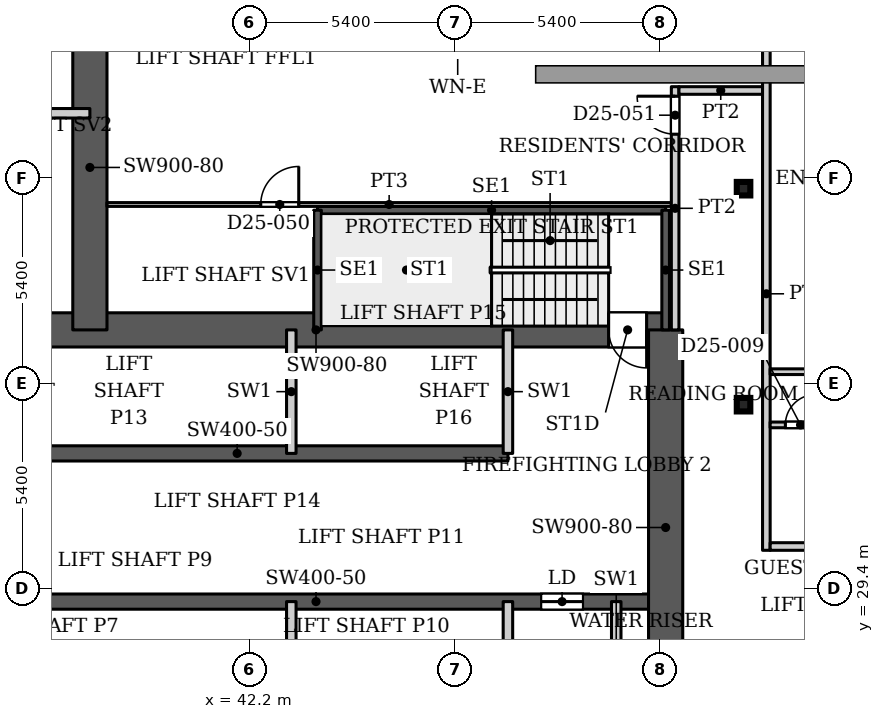
"""IFC4 building model, lengths in metres.
Left out: names, types, materials, properties, quantities, classifications, styles, units other than length and angle.
Written with IfcOpenShell. Run it as: python <this file> out.ifc"""

import sys

from ifc_helpers import new_model, si_unit, direction, frame, frame_2d, origin, origin_2d, place, context, subcontext, project, spatial, rectangle, hollow_rectangle, extrude, source, transform, mapped, element, fill, save


model = new_model("IFC4")
c1 = context("Model", 3, precision=1e-05, world=origin(), true_north=direction((0.0, 1.0)))
c2 = subcontext(c1, "Body", "Model", "MODEL_VIEW")
j1 = project(units=[si_unit("LENGTHUNIT", "METRE"), si_unit("PLANEANGLEUNIT", "RADIAN")], contexts=[c1])
p1 = place(None, origin())
s1 = spatial("IfcSite", under=j1, at=p1, CompositionType="ELEMENT")
p2 = place(p1, origin())
s2 = spatial("IfcBuilding", under=s1, at=p2, CompositionType="ELEMENT")
p3 = place(p2, frame((0.0, 0.0, 113.6)))
s3 = spatial("IfcBuildingStorey", under=s2, at=p3, CompositionType="ELEMENT", Elevation=113.6)
for number, where, z_axis, x_axis in (
    (1, (55.2, 34.232, 0.0), (0.0, 0.0, 1.0), (1.0, 0.0, 0.0)),
    (2, (55.2, 39.916, 0.0), (0.0, 0.0, 1.0), (1.0, 0.0, 0.0)),
):
    element("IfcColumn", number, at=place(p3, frame(where, z_axis=z_axis, x_axis=x_axis)), inside=s3, PredefinedType="COLUMN", context=c2, shape_type="SweptSolid", body=[
        extrude(hollow_rectangle(XDim=0.356, YDim=0.356, WallThickness=0.016, InnerFilletRadius=0.016, OuterFilletRadius=0.032, at=origin_2d()), origin(), (0.0, 0.0, 1.0), 3.9),
    ])
p4 = place(p3, frame((34.75, 29.05, 0.0), z_axis=(0.0, 0.0, 1.0), x_axis=(1.0, 0.0, 0.0)))
e3 = element("IfcWall", 3, at=p4, inside=s3, PredefinedType="SHEAR", context=c2, shape_type="SweptSolid", body=[
    extrude(rectangle(XDim=18.4, YDim=0.4, at=frame_2d((9.2, 0.0))), origin(), (0.0, 0.0, 1.0), 3.9),
])
p5 = place(p4, frame((15.125, 0.0, 0.0)))
e4 = element("IfcOpeningElement", 4, at=p5, cuts=e3, PredefinedType="OPENING", context=c2, shape_type="SweptSolid", body=[
    extrude(rectangle(XDim=1.1, YDim=2.2, at=frame_2d((0.55, 1.1))), frame((0.0, 0.21, 0.0), z_axis=(0.0, -1.0, 0.0), x_axis=(1.0, 0.0, 0.0)), (0.0, 0.0, 1.0), 0.42),
])
p6 = place(p3, frame((34.75, 32.95, 0.0), z_axis=(0.0, 0.0, 1.0), x_axis=(1.0, 0.0, 0.0)))
e5 = element("IfcWall", 5, at=p6, inside=s3, PredefinedType="SHEAR", context=c2, shape_type="SweptSolid", body=[
    extrude(rectangle(XDim=14.25, YDim=0.4, at=frame_2d((7.125, 0.0))), origin(), (0.0, 0.0, 1.0), 3.9),
])
p7 = place(p3, frame((34.75, 36.2, 0.0), z_axis=(0.0, 0.0, 1.0), x_axis=(1.0, 0.0, 0.0)))
e6 = element("IfcWall", 6, at=p7, inside=s3, PredefinedType="SHEAR", context=c2, shape_type="SweptSolid", body=[
    extrude(rectangle(XDim=18.4, YDim=0.9, at=frame_2d((9.2, 0.0))), origin(), (0.0, 0.0, 1.0), 3.9),
])
p8 = place(p7, frame((16.9, 0.0, 0.0)))
e7 = element("IfcOpeningElement", 7, at=p8, cuts=e6, PredefinedType="OPENING", context=c2, shape_type="SweptSolid", body=[
    extrude(rectangle(XDim=1.0, YDim=2.2, at=frame_2d((0.5, 1.1))), frame((0.0, 0.46, 0.0), z_axis=(0.0, -1.0, 0.0), x_axis=(1.0, 0.0, 0.0)), (0.0, 0.0, 1.0), 0.92),
])
p9 = place(p3, frame((38.0, 36.2, 0.0), z_axis=(0.0, 0.0, 1.0), x_axis=(0.0, 1.0, 0.0)))
e8 = element("IfcWall", 8, at=p9, inside=s3, PredefinedType="SHEAR", context=c2, shape_type="SweptSolid", body=[
    extrude(rectangle(XDim=8.55, YDim=0.9, at=frame_2d((4.275, 0.0))), origin(), (0.0, 0.0, 1.0), 3.9),
])
p10 = place(p3, frame((53.15, 25.8, 0.0), z_axis=(0.0, 0.0, 1.0), x_axis=(0.0, 1.0, 0.0)))
e9 = element("IfcWall", 9, at=p10, inside=s3, PredefinedType="SHEAR", context=c2, shape_type="SweptSolid", body=[
    extrude(rectangle(XDim=10.4, YDim=0.9, at=frame_2d((5.2, 0.0))), origin(), (0.0, 0.0, 1.0), 3.9),
])
p11 = place(p10, frame((1.175, 0.0, 0.0)))
e10 = element("IfcOpeningElement", 10, at=p11, cuts=e9, PredefinedType="OPENING", context=c2, shape_type="SweptSolid", body=[
    extrude(rectangle(XDim=0.9, YDim=2.2, at=frame_2d((0.45, 1.1))), frame((0.0, 0.46, 0.0), z_axis=(0.0, -1.0, 0.0), x_axis=(1.0, 0.0, 0.0)), (0.0, 0.0, 1.0), 0.92),
])
p12 = place(p3, frame((43.99, 39.35, 0.0), z_axis=(0.0, 0.0, 1.0), x_axis=(1.0, 0.0, 0.0)))
e11 = element("IfcWall", 11, at=p12, inside=s3, PredefinedType="SHEAR", context=c2, shape_type="SweptSolid", body=[
    extrude(rectangle(XDim=9.16, YDim=0.2, at=frame_2d((4.58, 0.0))), origin(), (0.0, 0.0, 1.0), 3.9),
])
for number, where, z_axis, x_axis in (
    (12, (43.99, 36.2, 0.0), (0.0, 0.0, 1.0), (0.0, 1.0, 0.0)),
    (13, (53.15, 36.2, 0.0), (0.0, 0.0, 1.0), (0.0, 1.0, 0.0)),
):
    element("IfcWall", number, at=place(p3, frame(where, z_axis=z_axis, x_axis=x_axis)), inside=s3, PredefinedType="SHEAR", context=c2, shape_type="SweptSolid", body=[
        extrude(rectangle(XDim=3.15, YDim=0.2, at=frame_2d((1.575, 0.0))), origin(), (0.0, 0.0, 1.0), 3.9),
    ])
for number, where, z_axis, x_axis in (
    (14, (43.3, 25.8, 0.0), (0.0, 0.0, 1.0), (0.0, 1.0, 0.0)),
    (15, (43.3, 32.95, 0.0), (0.0, 0.0, 1.0), (0.0, 1.0, 0.0)),
    (16, (49.0, 25.8, 0.0), (0.0, 0.0, 1.0), (0.0, 1.0, 0.0)),
    (17, (49.0, 32.95, 0.0), (0.0, 0.0, 1.0), (0.0, 1.0, 0.0)),
    (18, (51.85, 25.8, 0.0), (0.0, 0.0, 1.0), (0.0, 1.0, 0.0)),
    (19, (34.75, 41.9, 0.0), (0.0, 0.0, 1.0), (1.0, 0.0, 0.0)),
):
    element("IfcWall", number, at=place(p3, frame(where, z_axis=z_axis, x_axis=x_axis)), inside=s3, PredefinedType="PARTITIONING", context=c2, shape_type="SweptSolid", body=[
        extrude(rectangle(XDim=3.25, YDim=0.25, at=frame_2d((1.625, 0.0))), origin(), (0.0, 0.0, 1.0), 3.9),
    ])
p13 = place(p3, frame((38.449, 39.5, 0.0), z_axis=(0.0, 0.0, 1.0), x_axis=(1.0, 0.0, 0.0)))
e20 = element("IfcWall", 20, at=p13, inside=s3, PredefinedType="PARTITIONING", context=c2, shape_type="SweptSolid", body=[
    extrude(rectangle(XDim=14.851, YDim=0.1, at=frame_2d((7.426, 0.0))), origin(), (0.0, 0.0, 1.0), 3.6),
])
p14 = place(p13, frame((4.047, 0.0, 0.0)))
e21 = element("IfcOpeningElement", 21, at=p14, cuts=e20, PredefinedType="OPENING", context=c2, shape_type="SweptSolid", body=[
    extrude(rectangle(XDim=1.0, YDim=2.1, at=frame_2d((0.5, 1.05))), frame((0.0, 0.06, 0.0), z_axis=(0.0, -1.0, 0.0), x_axis=(1.0, 0.0, 0.0)), (0.0, 0.0, 1.0), 0.12),
])
p15 = place(p3, frame((53.4, 36.199, 0.0), z_axis=(0.0, 0.0, 1.0), x_axis=(0.0, 1.0, 0.0)))
e22 = element("IfcWall", 22, at=p15, inside=s3, PredefinedType="PARTITIONING", context=c2, shape_type="SweptSolid", body=[
    extrude(rectangle(XDim=6.401, YDim=0.2, at=frame_2d((3.201, 0.0))), origin(), (0.0, 0.0, 1.0), 3.6),
])
p16 = place(p15, frame((5.151, 0.0, 0.0)))
e23 = element("IfcOpeningElement", 23, at=p16, cuts=e22, PredefinedType="OPENING", context=c2, shape_type="SweptSolid", body=[
    extrude(rectangle(XDim=1.0, YDim=2.1, at=frame_2d((0.5, 1.05))), frame((0.0, 0.11, 0.0), z_axis=(0.0, -1.0, 0.0), x_axis=(1.0, 0.0, 0.0)), (0.0, 0.0, 1.0), 0.22),
])
p17 = place(p3, frame((53.5, 42.5, 0.0), z_axis=(0.0, 0.0, 1.0), x_axis=(1.0, 0.0, 0.0)))
e24 = element("IfcWall", 24, at=p17, inside=s3, PredefinedType="PARTITIONING", context=c2, shape_type="SweptSolid", body=[
    extrude(rectangle(XDim=2.2, YDim=0.2, at=frame_2d((1.1, 0.0))), origin(), (0.0, 0.0, 1.0), 3.6),
])
p18 = place(p3, frame((55.8, 30.4, 0.0), z_axis=(0.0, 0.0, 1.0), x_axis=(0.0, 1.0, 0.0)))
e25 = element("IfcWall", 25, at=p18, inside=s3, PredefinedType="PARTITIONING", context=c2, shape_type="SweptSolid", body=[
    extrude(rectangle(XDim=13.5, YDim=0.2, at=frame_2d((6.75, 0.0))), origin(), (0.0, 0.0, 1.0), 3.6),
])
p19 = place(p3, frame((55.9, 30.5, 0.0), z_axis=(0.0, 0.0, 1.0), x_axis=(1.0, 0.0, 0.0)))
e26 = element("IfcWall", 26, at=p19, inside=s3, PredefinedType="PARTITIONING", context=c2, shape_type="SweptSolid", body=[
    extrude(rectangle(XDim=42.2, YDim=0.2, at=frame_2d((21.1, 0.0))), origin(), (0.0, 0.0, 1.0), 3.6),
])
p20 = place(p19, frame((9.75, 0.0, 0.0)))
e27 = element("IfcOpeningElement", 27, at=p20, cuts=e26, PredefinedType="OPENING", context=c2, shape_type="SweptSolid", body=[
    extrude(rectangle(XDim=1.0, YDim=2.1, at=frame_2d((0.5, 1.05))), frame((0.0, 0.11, 0.0), z_axis=(0.0, -1.0, 0.0), x_axis=(1.0, 0.0, 0.0)), (0.0, 0.0, 1.0), 0.22),
])
p21 = place(p19, frame((18.6, 0.0, 0.0)))
e28 = element("IfcOpeningElement", 28, at=p21, cuts=e26, PredefinedType="OPENING", context=c2, shape_type="SweptSolid", body=[
    extrude(rectangle(XDim=1.0, YDim=2.1, at=frame_2d((0.5, 1.05))), frame((0.0, 0.11, 0.0), z_axis=(0.0, -1.0, 0.0), x_axis=(1.0, 0.0, 0.0)), (0.0, 0.0, 1.0), 0.22),
])
p22 = place(p19, frame((23.4, 0.0, 0.0)))
e29 = element("IfcOpeningElement", 29, at=p22, cuts=e26, PredefinedType="OPENING", context=c2, shape_type="SweptSolid", body=[
    extrude(rectangle(XDim=1.0, YDim=2.1, at=frame_2d((0.5, 1.05))), frame((0.0, 0.11, 0.0), z_axis=(0.0, -1.0, 0.0), x_axis=(1.0, 0.0, 0.0)), (0.0, 0.0, 1.0), 0.22),
])
p23 = place(p19, frame((40.2, 0.0, 0.0)))
e30 = element("IfcOpeningElement", 30, at=p23, cuts=e26, PredefinedType="OPENING", context=c2, shape_type="SweptSolid", body=[
    extrude(rectangle(XDim=1.0, YDim=2.1, at=frame_2d((0.5, 1.05))), frame((0.0, 0.11, 0.0), z_axis=(0.0, -1.0, 0.0), x_axis=(1.0, 0.0, 0.0)), (0.0, 0.0, 1.0), 0.22),
])
p24 = place(p3, frame((55.9, 33.7, 0.0), z_axis=(0.0, 0.0, 1.0), x_axis=(1.0, 0.0, 0.0)))
e31 = element("IfcWall", 31, at=p24, inside=s3, PredefinedType="PARTITIONING", context=c2, shape_type="SweptSolid", body=[
    extrude(rectangle(XDim=9.275, YDim=0.15, at=frame_2d((4.638, 0.0))), origin(), (0.0, 0.0, 1.0), 3.6),
])
p25 = place(p24, frame((7.6, 0.0, 0.0)))
e32 = element("IfcOpeningElement", 32, at=p25, cuts=e31, PredefinedType="OPENING", context=c2, shape_type="SweptSolid", body=[
    extrude(rectangle(XDim=0.8, YDim=2.1, at=frame_2d((0.4, 1.05))), frame((0.0, 0.085, 0.0), z_axis=(0.0, -1.0, 0.0), x_axis=(1.0, 0.0, 0.0)), (0.0, 0.0, 1.0), 0.17),
])
p26 = place(p24, frame((2.9, 0.0, 0.0)))
e33 = element("IfcOpeningElement", 33, at=p26, cuts=e31, PredefinedType="OPENING", context=c2, shape_type="SweptSolid", body=[
    extrude(rectangle(XDim=0.9, YDim=2.1, at=frame_2d((0.45, 1.05))), frame((0.0, 0.085, 0.0), z_axis=(0.0, -1.0, 0.0), x_axis=(1.0, 0.0, 0.0)), (0.0, 0.0, 1.0), 0.17),
])
p27 = place(p24, frame((5.5, 0.0, 0.0)))
e34 = element("IfcOpeningElement", 34, at=p27, cuts=e31, PredefinedType="OPENING", context=c2, shape_type="SweptSolid", body=[
    extrude(rectangle(XDim=0.8, YDim=2.1, at=frame_2d((0.4, 1.05))), frame((0.0, 0.085, 0.0), z_axis=(0.0, -1.0, 0.0), x_axis=(1.0, 0.0, 0.0)), (0.0, 0.0, 1.0), 0.17),
])
p28 = place(p24, frame((0.4, 0.0, 0.0)))
e35 = element("IfcOpeningElement", 35, at=p28, cuts=e31, PredefinedType="OPENING", context=c2, shape_type="SweptSolid", body=[
    extrude(rectangle(XDim=0.8, YDim=2.1, at=frame_2d((0.4, 1.05))), frame((0.0, 0.085, 0.0), z_axis=(0.0, -1.0, 0.0), x_axis=(1.0, 0.0, 0.0)), (0.0, 0.0, 1.0), 0.17),
])
p29 = place(p3, frame((55.9, 35.1, 0.0), z_axis=(0.0, 0.0, 1.0), x_axis=(1.0, 0.0, 0.0)))
e36 = element("IfcWall", 36, at=p29, inside=s3, PredefinedType="PARTITIONING", context=c2, shape_type="SweptSolid", body=[
    extrude(rectangle(XDim=11.2, YDim=0.15, at=frame_2d((5.6, 0.0))), origin(), (0.0, 0.0, 1.0), 3.6),
])
p30 = place(p29, frame((9.05, 0.0, 0.0)))
e37 = element("IfcOpeningElement", 37, at=p30, cuts=e36, PredefinedType="OPENING", context=c2, shape_type="SweptSolid", body=[
    extrude(rectangle(XDim=0.9, YDim=2.1, at=frame_2d((0.45, 1.05))), frame((0.0, 0.085, 0.0), z_axis=(0.0, -1.0, 0.0), x_axis=(1.0, 0.0, 0.0)), (0.0, 0.0, 1.0), 0.17),
])
p31 = place(p29, frame((1.5, 0.0, 0.0)))
e38 = element("IfcOpeningElement", 38, at=p31, cuts=e36, PredefinedType="OPENING", context=c2, shape_type="SweptSolid", body=[
    extrude(rectangle(XDim=1.0, YDim=2.1, at=frame_2d((0.5, 1.05))), frame((0.0, 0.085, 0.0), z_axis=(0.0, -1.0, 0.0), x_axis=(1.0, 0.0, 0.0)), (0.0, 0.0, 1.0), 0.17),
])
p32 = place(p29, frame((6.5, 0.0, 0.0)))
e39 = element("IfcOpeningElement", 39, at=p32, cuts=e36, PredefinedType="OPENING", context=c2, shape_type="SweptSolid", body=[
    extrude(rectangle(XDim=0.9, YDim=2.1, at=frame_2d((0.45, 1.05))), frame((0.0, 0.085, 0.0), z_axis=(0.0, -1.0, 0.0), x_axis=(1.0, 0.0, 0.0)), (0.0, 0.0, 1.0), 0.17),
])
m1 = source(origin(), c2, "Body", "SweptSolid", [
    extrude(rectangle(XDim=1.1, YDim=2.2, at=frame_2d((0.55, 1.1))), frame((0.0, 0.025, 0.0), z_axis=(0.0, -1.0, 0.0), x_axis=(1.0, 0.0, 0.0)), (0.0, 0.0, 1.0), 0.05),
])
p33 = place(p5, origin())
e40 = element("IfcDoor", 40, at=p33, inside=s3, OperationType="SLIDING_TO_LEFT", PredefinedType="DOOR", context=c2, shape_type="MappedRepresentation", body=[
    mapped(m1, transform((0.0, 0.0, 0.0), x_axis=(1.0, 0.0, 0.0), y_axis=(0.0, 1.0, 0.0), z_axis=(0.0, 0.0, 1.0), scale=1.0)),
])
fill(e4, e40)
m2 = source(origin(), c2, "Body", "SweptSolid", [
    extrude(rectangle(XDim=1.0, YDim=2.2, at=frame_2d((0.5, 1.1))), frame((0.0, 0.025, 0.0), z_axis=(0.0, -1.0, 0.0), x_axis=(1.0, 0.0, 0.0)), (0.0, 0.0, 1.0), 0.05),
])
p34 = place(p8, origin())
e41 = element("IfcDoor", 41, at=p34, inside=s3, OperationType="SINGLE_SWING_RIGHT", PredefinedType="DOOR", context=c2, shape_type="MappedRepresentation", body=[
    mapped(m2, transform((0.0, 0.0, 0.0), x_axis=(1.0, 0.0, 0.0), y_axis=(0.0, 1.0, 0.0), z_axis=(0.0, 0.0, 1.0), scale=1.0)),
])
fill(e7, e41)
m3 = source(origin(), c2, "Body", "SweptSolid", [
    extrude(rectangle(XDim=0.8, YDim=2.1, at=frame_2d((0.4, 1.05))), frame((0.0, 0.025, 0.0), z_axis=(0.0, -1.0, 0.0), x_axis=(1.0, 0.0, 0.0)), (0.0, 0.0, 1.0), 0.05),
])
p35 = place(p28, origin())
e42 = element("IfcDoor", 42, at=p35, inside=s3, OperationType="SINGLE_SWING_LEFT", PredefinedType="DOOR", context=c2, shape_type="MappedRepresentation", body=[
    mapped(m3, transform((0.0, 0.0, 0.0), x_axis=(1.0, 0.0, 0.0), y_axis=(0.0, 1.0, 0.0), z_axis=(0.0, 0.0, 1.0), scale=1.0)),
])
fill(e35, e42)
m4 = source(origin(), c2, "Body", "SweptSolid", [
    extrude(rectangle(XDim=1.0, YDim=2.1, at=frame_2d((0.5, 1.05))), frame((0.0, 0.025, 0.0), z_axis=(0.0, -1.0, 0.0), x_axis=(1.0, 0.0, 0.0)), (0.0, 0.0, 1.0), 0.05),
])
p36 = place(p14, origin())
e43 = element("IfcDoor", 43, at=p36, inside=s3, OperationType="SINGLE_SWING_LEFT", PredefinedType="DOOR", context=c2, shape_type="MappedRepresentation", body=[
    mapped(m4, transform((0.0, 0.0, 0.0), x_axis=(1.0, 0.0, 0.0), y_axis=(0.0, 1.0, 0.0), z_axis=(0.0, 0.0, 1.0), scale=1.0)),
])
fill(e21, e43)
m5 = source(origin(), c2, "Body", "SweptSolid", [
    extrude(rectangle(XDim=1.0, YDim=2.1, at=frame_2d((0.5, 1.05))), frame((0.0, 0.025, 0.0), z_axis=(0.0, -1.0, 0.0), x_axis=(1.0, 0.0, 0.0)), (0.0, 0.0, 1.0), 0.05),
])
p37 = place(p16, origin())
e44 = element("IfcDoor", 44, at=p37, inside=s3, OperationType="SINGLE_SWING_LEFT", PredefinedType="DOOR", context=c2, shape_type="MappedRepresentation", body=[
    mapped(m5, transform((0.0, 0.0, 0.0), x_axis=(1.0, 0.0, 0.0), y_axis=(0.0, 1.0, 0.0), z_axis=(0.0, 0.0, 1.0), scale=1.0)),
])
fill(e23, e44)
save(model, sys.argv[1])
